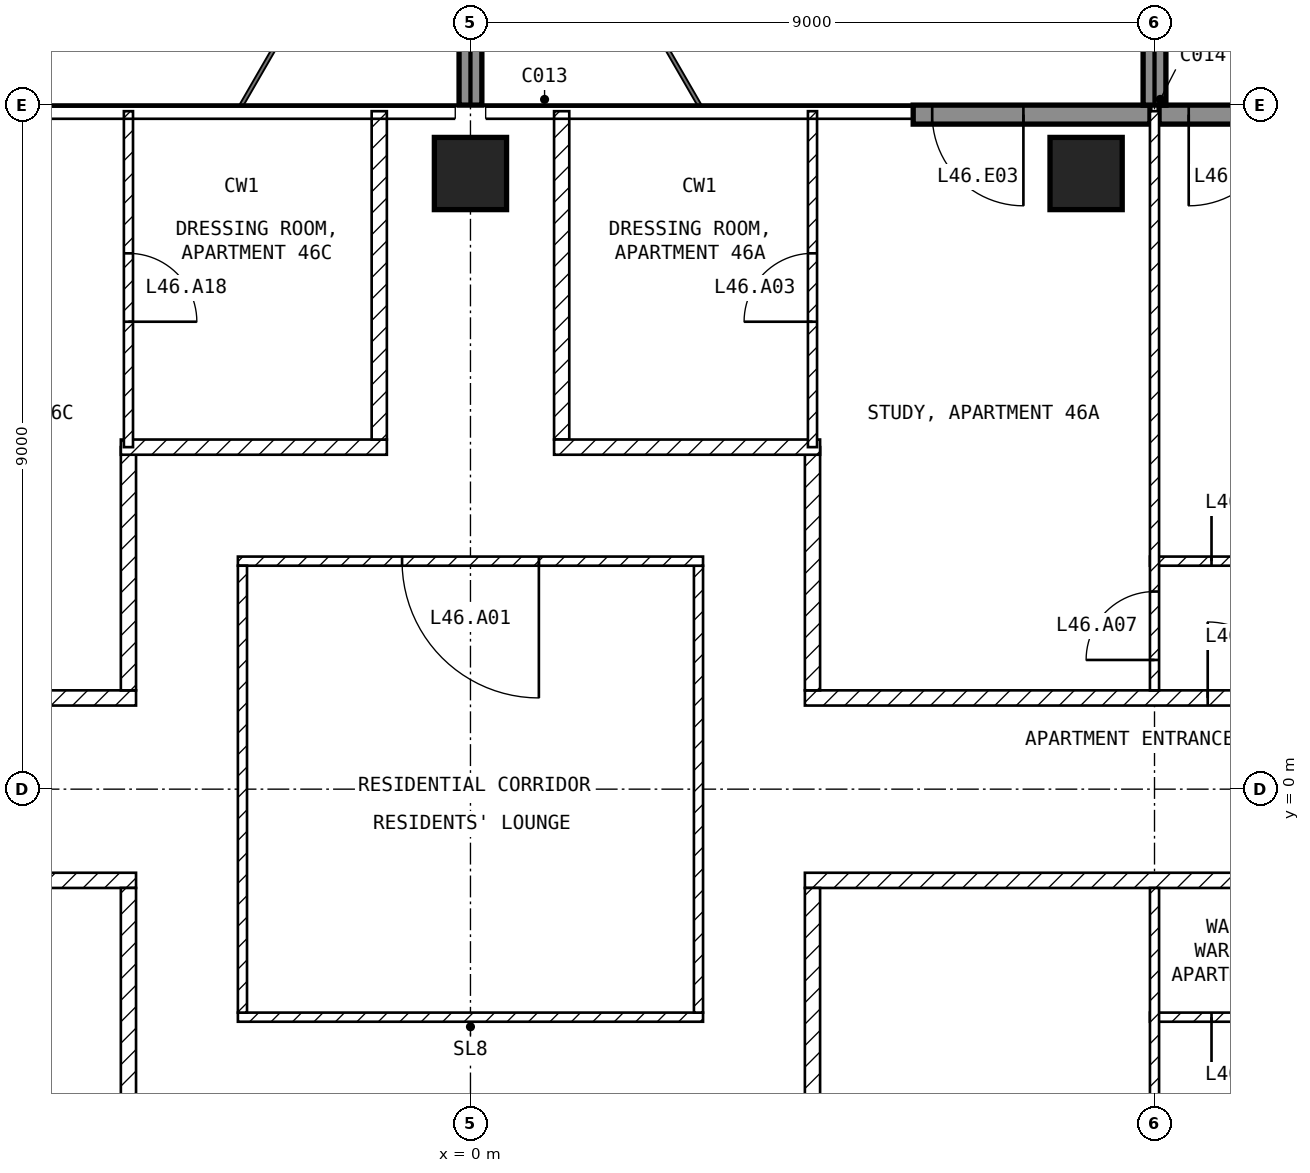
"""IFC4 building model, lengths in metres.
Left out: names, types, materials, properties, quantities, classifications, styles, units other than length and angle.
Written with IfcOpenShell. Run it as: python <this file> out.ifc"""

import sys

from ifc_helpers import new_model, si_unit, direction, frame, frame_2d, origin, origin_2d, place, context, subcontext, project, spatial, rectangle, extrude, element, fill, save


model = new_model("IFC4")
c1 = context("Model", 3, precision=1e-05, world=origin(), true_north=direction((0.0, 1.0)))
c2 = subcontext(c1, "Body", "Model", "MODEL_VIEW")
j1 = project(units=[si_unit("LENGTHUNIT", "METRE"), si_unit("PLANEANGLEUNIT", "RADIAN")], contexts=[c1])
p1 = place(None, origin())
s1 = spatial("IfcSite", under=j1, at=p1, CompositionType="ELEMENT")
p2 = place(p1, origin())
s2 = spatial("IfcBuilding", under=s1, at=p2, CompositionType="ELEMENT")
p3 = place(p2, frame((0.0, 0.0, 187.6)))
s3 = spatial("IfcBuildingStorey", under=s2, at=p3, CompositionType="ELEMENT", Elevation=187.6)
for number, where, z_axis, x_axis in (
    (1, (0.0, 8.1, -0.25), (0.0, 0.0, 1.0), (1.0, 0.0, 0.0)),
    (2, (8.1, 8.1, -0.25), (0.0, 0.0, 1.0), (1.0, 0.0, 0.0)),
):
    element("IfcColumn", number, at=place(p3, frame(where, z_axis=z_axis, x_axis=x_axis)), inside=s3, PredefinedType="COLUMN", context=c2, shape_type="SweptSolid", body=[
        extrude(rectangle(XDim=0.95, YDim=0.95, at=origin_2d()), origin(), (0.0, 0.0, 1.0), 3.5),
    ])
p4 = place(p3, frame((10.9, 8.875, 0.0), z_axis=(0.0, 0.0, 1.0), x_axis=(-1.0, 0.0, 0.0)))
e3 = element("IfcWall", 3, at=p4, inside=s3, PredefinedType="SOLIDWALL", context=c2, shape_type="SweptSolid", body=[
    extrude(rectangle(XDim=1.84, YDim=0.25, at=frame_2d((0.92, 0.0))), origin(), (0.0, 0.0, 1.0), 3.25),
])
p5 = place(p4, frame((0.25, 0.0, 0.0)))
e4 = element("IfcOpeningElement", 4, at=p5, cuts=e3, PredefinedType="OPENING", context=c2, shape_type="SweptSolid", body=[
    extrude(rectangle(XDim=1.2, YDim=2.4, at=frame_2d((0.6, 1.2))), frame((0.0, 0.135, 0.0), z_axis=(0.0, -1.0, 0.0), x_axis=(1.0, 0.0, 0.0)), (0.0, 0.0, 1.0), 0.27),
])
p6 = place(p3, frame((8.94, 8.875, 0.0), z_axis=(0.0, 0.0, 1.0), x_axis=(-1.0, 0.0, 0.0)))
e5 = element("IfcWall", 5, at=p6, inside=s3, PredefinedType="SOLIDWALL", context=c2, shape_type="SweptSolid", body=[
    extrude(rectangle(XDim=3.115, YDim=0.25, at=frame_2d((1.558, 0.0))), origin(), (0.0, 0.0, 1.0), 3.25),
])
p7 = place(p6, frame((1.665, 0.0, 0.0)))
e6 = element("IfcOpeningElement", 6, at=p7, cuts=e5, PredefinedType="OPENING", context=c2, shape_type="SweptSolid", body=[
    extrude(rectangle(XDim=1.2, YDim=2.4, at=frame_2d((0.6, 1.2))), frame((0.0, 0.135, 0.0), z_axis=(0.0, -1.0, 0.0), x_axis=(1.0, 0.0, 0.0)), (0.0, 0.0, 1.0), 0.27),
])
for number, where, z_axis, x_axis in (
    (7, (0.0, 9.0, 0.0), (0.0, 0.0, 1.0), (0.0, 1.0, 0.0)),
    (8, (9.0, 9.0, 0.0), (0.0, 0.0, 1.0), (0.0, 1.0, 0.0)),
):
    element("IfcWall", number, at=place(p3, frame(where, z_axis=z_axis, x_axis=x_axis)), inside=s3, PredefinedType="SOLIDWALL", context=c2, shape_type="SweptSolid", body=[
        extrude(rectangle(XDim=2.7, YDim=0.3, at=frame_2d((1.35, 0.0))), origin(), (0.0, 0.0, 1.0), 3.25),
    ])
p8 = place(p3, frame((-3.06, -3.0, 0.0), z_axis=(0.0, 0.0, 1.0), x_axis=(1.0, 0.0, 0.0)))
e9 = element("IfcWall", 9, at=p8, inside=s3, PredefinedType="PARTITIONING", context=c2, shape_type="SweptSolid", body=[
    extrude(rectangle(XDim=6.12, YDim=0.12, at=frame_2d((3.06, 0.0))), origin(), (0.0, 0.0, 1.0), 3.25),
])
p9 = place(p3, frame((3.0, -2.94, 0.0), z_axis=(0.0, 0.0, 1.0), x_axis=(0.0, 1.0, 0.0)))
e10 = element("IfcWall", 10, at=p9, inside=s3, PredefinedType="PARTITIONING", context=c2, shape_type="SweptSolid", body=[
    extrude(rectangle(XDim=5.88, YDim=0.12, at=frame_2d((2.94, 0.0))), origin(), (0.0, 0.0, 1.0), 3.25),
])
p10 = place(p3, frame((3.06, 3.0, 0.0), z_axis=(0.0, 0.0, 1.0), x_axis=(-1.0, 0.0, 0.0)))
e11 = element("IfcWall", 11, at=p10, inside=s3, PredefinedType="PARTITIONING", context=c2, shape_type="SweptSolid", body=[
    extrude(rectangle(XDim=6.12, YDim=0.12, at=frame_2d((3.06, 0.0))), origin(), (0.0, 0.0, 1.0), 3.25),
])
p11 = place(p10, frame((2.16, 0.0, 0.0)))
e12 = element("IfcOpeningElement", 12, at=p11, cuts=e11, PredefinedType="OPENING", context=c2, shape_type="SweptSolid", body=[
    extrude(rectangle(XDim=1.8, YDim=2.1, at=frame_2d((0.9, 1.05))), frame((0.0, 0.07, 0.0), z_axis=(0.0, -1.0, 0.0), x_axis=(1.0, 0.0, 0.0)), (0.0, 0.0, 1.0), 0.14),
])
p12 = place(p3, frame((-3.0, 2.94, 0.0), z_axis=(0.0, 0.0, 1.0), x_axis=(0.0, -1.0, 0.0)))
e13 = element("IfcWall", 13, at=p12, inside=s3, PredefinedType="PARTITIONING", context=c2, shape_type="SweptSolid", body=[
    extrude(rectangle(XDim=5.88, YDim=0.12, at=frame_2d((2.94, 0.0))), origin(), (0.0, 0.0, 1.0), 3.25),
])
p13 = place(p3, frame((4.4, 1.2, 0.0), z_axis=(0.0, 0.0, 1.0), x_axis=(1.0, 0.0, 0.0)))
e14 = element("IfcWall", 14, at=p13, inside=s3, PredefinedType="PARTITIONING", context=c2, shape_type="SweptSolid", body=[
    extrude(rectangle(XDim=17.2, YDim=0.2, at=frame_2d((8.6, 0.0))), origin(), (0.0, 0.0, 1.0), 3.25),
])
p14 = place(p13, frame((5.3, 0.0, 0.0)))
e15 = element("IfcOpeningElement", 15, at=p14, cuts=e14, PredefinedType="OPENING", context=c2, shape_type="SweptSolid", body=[
    extrude(rectangle(XDim=1.0, YDim=2.1, at=frame_2d((0.5, 1.05))), frame((0.0, 0.11, 0.0), z_axis=(0.0, -1.0, 0.0), x_axis=(1.0, 0.0, 0.0)), (0.0, 0.0, 1.0), 0.22),
])
p15 = place(p3, frame((4.5, 4.5, 0.0), z_axis=(0.0, 0.0, 1.0), x_axis=(0.0, -1.0, 0.0)))
e16 = element("IfcWall", 16, at=p15, inside=s3, PredefinedType="PARTITIONING", context=c2, shape_type="SweptSolid", body=[
    extrude(rectangle(XDim=3.2, YDim=0.2, at=frame_2d((1.6, 0.0))), origin(), (0.0, 0.0, 1.0), 3.25),
])
p16 = place(p3, frame((1.2, 8.92, 0.0), z_axis=(0.0, 0.0, 1.0), x_axis=(0.0, -1.0, 0.0)))
e17 = element("IfcWall", 17, at=p16, inside=s3, PredefinedType="PARTITIONING", context=c2, shape_type="SweptSolid", body=[
    extrude(rectangle(XDim=4.32, YDim=0.2, at=frame_2d((2.16, 0.0))), origin(), (0.0, 0.0, 1.0), 3.25),
])
p17 = place(p3, frame((1.1, 4.5, 0.0), z_axis=(0.0, 0.0, 1.0), x_axis=(1.0, 0.0, 0.0)))
e18 = element("IfcWall", 18, at=p17, inside=s3, PredefinedType="PARTITIONING", context=c2, shape_type="SweptSolid", body=[
    extrude(rectangle(XDim=3.5, YDim=0.2, at=frame_2d((1.75, 0.0))), origin(), (0.0, 0.0, 1.0), 3.25),
])
p18 = place(p3, frame((21.6, -1.2, 0.0), z_axis=(0.0, 0.0, 1.0), x_axis=(-1.0, 0.0, 0.0)))
e19 = element("IfcWall", 19, at=p18, inside=s3, PredefinedType="PARTITIONING", context=c2, shape_type="SweptSolid", body=[
    extrude(rectangle(XDim=17.2, YDim=0.2, at=frame_2d((8.6, 0.0))), origin(), (0.0, 0.0, 1.0), 3.25),
])
p19 = place(p18, frame((6.1, 0.0, 0.0)))
e20 = element("IfcOpeningElement", 20, at=p19, cuts=e19, PredefinedType="OPENING", context=c2, shape_type="SweptSolid", body=[
    extrude(rectangle(XDim=1.0, YDim=2.1, at=frame_2d((0.5, 1.05))), frame((0.0, 0.11, 0.0), z_axis=(0.0, -1.0, 0.0), x_axis=(1.0, 0.0, 0.0)), (0.0, 0.0, 1.0), 0.22),
])
p20 = place(p3, frame((4.5, -1.3, 0.0), z_axis=(0.0, 0.0, 1.0), x_axis=(0.0, -1.0, 0.0)))
e21 = element("IfcWall", 21, at=p20, inside=s3, PredefinedType="PARTITIONING", context=c2, shape_type="SweptSolid", body=[
    extrude(rectangle(XDim=3.2, YDim=0.2, at=frame_2d((1.6, 0.0))), origin(), (0.0, 0.0, 1.0), 3.25),
])
p21 = place(p3, frame((-21.6, 1.2, 0.0), z_axis=(0.0, 0.0, 1.0), x_axis=(1.0, 0.0, 0.0)))
e22 = element("IfcWall", 22, at=p21, inside=s3, PredefinedType="PARTITIONING", context=c2, shape_type="SweptSolid", body=[
    extrude(rectangle(XDim=17.2, YDim=0.2, at=frame_2d((8.6, 0.0))), origin(), (0.0, 0.0, 1.0), 3.25),
])
p22 = place(p21, frame((6.1, 0.0, 0.0)))
e23 = element("IfcOpeningElement", 23, at=p22, cuts=e22, PredefinedType="OPENING", context=c2, shape_type="SweptSolid", body=[
    extrude(rectangle(XDim=1.0, YDim=2.1, at=frame_2d((0.5, 1.05))), frame((0.0, 0.11, 0.0), z_axis=(0.0, -1.0, 0.0), x_axis=(1.0, 0.0, 0.0)), (0.0, 0.0, 1.0), 0.22),
])
p23 = place(p3, frame((-4.5, 1.3, 0.0), z_axis=(0.0, 0.0, 1.0), x_axis=(0.0, 1.0, 0.0)))
e24 = element("IfcWall", 24, at=p23, inside=s3, PredefinedType="PARTITIONING", context=c2, shape_type="SweptSolid", body=[
    extrude(rectangle(XDim=3.2, YDim=0.2, at=frame_2d((1.6, 0.0))), origin(), (0.0, 0.0, 1.0), 3.25),
])
p24 = place(p3, frame((-4.6, 4.5, 0.0), z_axis=(0.0, 0.0, 1.0), x_axis=(1.0, 0.0, 0.0)))
e25 = element("IfcWall", 25, at=p24, inside=s3, PredefinedType="PARTITIONING", context=c2, shape_type="SweptSolid", body=[
    extrude(rectangle(XDim=3.5, YDim=0.2, at=frame_2d((1.75, 0.0))), origin(), (0.0, 0.0, 1.0), 3.25),
])
p25 = place(p3, frame((-1.2, 4.6, 0.0), z_axis=(0.0, 0.0, 1.0), x_axis=(0.0, 1.0, 0.0)))
e26 = element("IfcWall", 26, at=p25, inside=s3, PredefinedType="PARTITIONING", context=c2, shape_type="SweptSolid", body=[
    extrude(rectangle(XDim=4.32, YDim=0.2, at=frame_2d((2.16, 0.0))), origin(), (0.0, 0.0, 1.0), 3.25),
])
p26 = place(p3, frame((-4.4, -1.2, 0.0), z_axis=(0.0, 0.0, 1.0), x_axis=(-1.0, 0.0, 0.0)))
e27 = element("IfcWall", 27, at=p26, inside=s3, PredefinedType="PARTITIONING", context=c2, shape_type="SweptSolid", body=[
    extrude(rectangle(XDim=17.2, YDim=0.2, at=frame_2d((8.6, 0.0))), origin(), (0.0, 0.0, 1.0), 3.25),
])
p27 = place(p26, frame((5.3, 0.0, 0.0)))
e28 = element("IfcOpeningElement", 28, at=p27, cuts=e27, PredefinedType="OPENING", context=c2, shape_type="SweptSolid", body=[
    extrude(rectangle(XDim=1.0, YDim=2.1, at=frame_2d((0.5, 1.05))), frame((0.0, 0.11, 0.0), z_axis=(0.0, -1.0, 0.0), x_axis=(1.0, 0.0, 0.0)), (0.0, 0.0, 1.0), 0.22),
])
p28 = place(p3, frame((-4.5, -4.5, 0.0), z_axis=(0.0, 0.0, 1.0), x_axis=(0.0, 1.0, 0.0)))
e29 = element("IfcWall", 29, at=p28, inside=s3, PredefinedType="PARTITIONING", context=c2, shape_type="SweptSolid", body=[
    extrude(rectangle(XDim=3.2, YDim=0.2, at=frame_2d((1.6, 0.0))), origin(), (0.0, 0.0, 1.0), 3.25),
])
p29 = place(p3, frame((8.94, 3.0, 0.0), z_axis=(0.0, 0.0, 1.0), x_axis=(1.0, 0.0, 0.0)))
e30 = element("IfcWall", 30, at=p29, inside=s3, PredefinedType="PARTITIONING", context=c2, shape_type="SweptSolid", body=[
    extrude(rectangle(XDim=5.46, YDim=0.12, at=frame_2d((2.73, 0.0))), origin(), (0.0, 0.0, 1.0), 3.25),
])
p30 = place(p29, frame((0.81, 0.0, 0.0)))
e31 = element("IfcOpeningElement", 31, at=p30, cuts=e30, PredefinedType="OPENING", context=c2, shape_type="SweptSolid", body=[
    extrude(rectangle(XDim=0.9, YDim=2.1, at=frame_2d((0.45, 1.05))), frame((0.0, 0.07, 0.0), z_axis=(0.0, -1.0, 0.0), x_axis=(1.0, 0.0, 0.0)), (0.0, 0.0, 1.0), 0.14),
])
p31 = place(p3, frame((9.0, 1.3, 0.0), z_axis=(0.0, 0.0, 1.0), x_axis=(0.0, 1.0, 0.0)))
e32 = element("IfcWall", 32, at=p31, inside=s3, PredefinedType="PARTITIONING", context=c2, shape_type="SweptSolid", body=[
    extrude(rectangle(XDim=7.62, YDim=0.12, at=frame_2d((3.81, 0.0))), origin(), (0.0, 0.0, 1.0), 3.25),
])
p32 = place(p31, frame((0.4, 0.0, 0.0)))
e33 = element("IfcOpeningElement", 33, at=p32, cuts=e32, PredefinedType="OPENING", context=c2, shape_type="SweptSolid", body=[
    extrude(rectangle(XDim=0.9, YDim=2.1, at=frame_2d((0.45, 1.05))), frame((0.0, 0.07, 0.0), z_axis=(0.0, -1.0, 0.0), x_axis=(1.0, 0.0, 0.0)), (0.0, 0.0, 1.0), 0.14),
])
p33 = place(p3, frame((4.5, 4.5, 0.0), z_axis=(0.0, 0.0, 1.0), x_axis=(0.0, 1.0, 0.0)))
e34 = element("IfcWall", 34, at=p33, inside=s3, PredefinedType="PARTITIONING", context=c2, shape_type="SweptSolid", body=[
    extrude(rectangle(XDim=4.42, YDim=0.12, at=frame_2d((2.21, 0.0))), origin(), (0.0, 0.0, 1.0), 3.25),
])
p34 = place(p33, frame((1.65, 0.0, 0.0)))
e35 = element("IfcOpeningElement", 35, at=p34, cuts=e34, PredefinedType="OPENING", context=c2, shape_type="SweptSolid", body=[
    extrude(rectangle(XDim=0.9, YDim=2.1, at=frame_2d((0.45, 1.05))), frame((0.0, 0.07, 0.0), z_axis=(0.0, -1.0, 0.0), x_axis=(1.0, 0.0, 0.0)), (0.0, 0.0, 1.0), 0.14),
])
p35 = place(p3, frame((11.4, -3.0, 0.0), z_axis=(0.0, 0.0, 1.0), x_axis=(-1.0, 0.0, 0.0)))
e36 = element("IfcWall", 36, at=p35, inside=s3, PredefinedType="PARTITIONING", context=c2, shape_type="SweptSolid", body=[
    extrude(rectangle(XDim=2.46, YDim=0.12, at=frame_2d((1.23, 0.0))), origin(), (0.0, 0.0, 1.0), 3.25),
])
p36 = place(p35, frame((0.75, 0.0, 0.0)))
e37 = element("IfcOpeningElement", 37, at=p36, cuts=e36, PredefinedType="OPENING", context=c2, shape_type="SweptSolid", body=[
    extrude(rectangle(XDim=0.9, YDim=2.1, at=frame_2d((0.45, 1.05))), frame((0.0, 0.07, 0.0), z_axis=(0.0, -1.0, 0.0), x_axis=(1.0, 0.0, 0.0)), (0.0, 0.0, 1.0), 0.14),
])
p37 = place(p3, frame((9.0, -8.92, 0.0), z_axis=(0.0, 0.0, 1.0), x_axis=(0.0, 1.0, 0.0)))
e38 = element("IfcWall", 38, at=p37, inside=s3, PredefinedType="PARTITIONING", context=c2, shape_type="SweptSolid", body=[
    extrude(rectangle(XDim=7.62, YDim=0.12, at=frame_2d((3.81, 0.0))), origin(), (0.0, 0.0, 1.0), 3.25),
])
p38 = place(p37, frame((2.62, 0.0, 0.0)))
e39 = element("IfcOpeningElement", 39, at=p38, cuts=e38, PredefinedType="OPENING", context=c2, shape_type="SweptSolid", body=[
    extrude(rectangle(XDim=0.9, YDim=2.1, at=frame_2d((0.45, 1.05))), frame((0.0, 0.07, 0.0), z_axis=(0.0, -1.0, 0.0), x_axis=(1.0, 0.0, 0.0)), (0.0, 0.0, 1.0), 0.14),
])
p39 = place(p3, frame((-4.5, 8.92, 0.0), z_axis=(0.0, 0.0, 1.0), x_axis=(0.0, -1.0, 0.0)))
e40 = element("IfcWall", 40, at=p39, inside=s3, PredefinedType="PARTITIONING", context=c2, shape_type="SweptSolid", body=[
    extrude(rectangle(XDim=4.42, YDim=0.12, at=frame_2d((2.21, 0.0))), origin(), (0.0, 0.0, 1.0), 3.25),
])
p40 = place(p39, frame((1.87, 0.0, 0.0)))
e41 = element("IfcOpeningElement", 41, at=p40, cuts=e40, PredefinedType="OPENING", context=c2, shape_type="SweptSolid", body=[
    extrude(rectangle(XDim=0.9, YDim=2.1, at=frame_2d((0.45, 1.05))), frame((0.0, 0.07, 0.0), z_axis=(0.0, -1.0, 0.0), x_axis=(1.0, 0.0, 0.0)), (0.0, 0.0, 1.0), 0.14),
])
p41 = place(p5, origin())
e42 = element("IfcDoor", 42, at=p41, inside=s3, OperationType="SINGLE_SWING_RIGHT", PredefinedType="DOOR", context=c2, shape_type="SweptSolid", body=[
    extrude(rectangle(XDim=1.2, YDim=2.4, at=frame_2d((0.6, 1.2))), frame((0.0, 0.025, 0.0), z_axis=(0.0, -1.0, 0.0), x_axis=(1.0, 0.0, 0.0)), (0.0, 0.0, 1.0), 0.05),
])
fill(e4, e42)
p42 = place(p7, origin())
e43 = element("IfcDoor", 43, at=p42, inside=s3, OperationType="SINGLE_SWING_LEFT", PredefinedType="DOOR", context=c2, shape_type="SweptSolid", body=[
    extrude(rectangle(XDim=1.2, YDim=2.4, at=frame_2d((0.6, 1.2))), frame((0.0, 0.025, 0.0), z_axis=(0.0, -1.0, 0.0), x_axis=(1.0, 0.0, 0.0)), (0.0, 0.0, 1.0), 0.05),
])
fill(e6, e43)
p43 = place(p11, origin())
e44 = element("IfcDoor", 44, at=p43, inside=s3, OperationType="SINGLE_SWING_LEFT", PredefinedType="DOOR", context=c2, shape_type="SweptSolid", body=[
    extrude(rectangle(XDim=1.8, YDim=2.1, at=frame_2d((0.9, 1.05))), frame((0.0, 0.025, 0.0), z_axis=(0.0, -1.0, 0.0), x_axis=(1.0, 0.0, 0.0)), (0.0, 0.0, 1.0), 0.05),
])
fill(e12, e44)
p44 = place(p34, origin())
e45 = element("IfcDoor", 45, at=p44, inside=s3, OperationType="SINGLE_SWING_LEFT", PredefinedType="DOOR", context=c2, shape_type="SweptSolid", body=[
    extrude(rectangle(XDim=0.9, YDim=2.1, at=frame_2d((0.45, 1.05))), frame((0.0, 0.025, 0.0), z_axis=(0.0, -1.0, 0.0), x_axis=(1.0, 0.0, 0.0)), (0.0, 0.0, 1.0), 0.05),
])
fill(e35, e45)
p45 = place(p30, origin())
e46 = element("IfcDoor", 46, at=p45, inside=s3, OperationType="SINGLE_SWING_LEFT", PredefinedType="DOOR", context=c2, shape_type="SweptSolid", body=[
    extrude(rectangle(XDim=0.9, YDim=2.1, at=frame_2d((0.45, 1.05))), frame((0.0, 0.025, 0.0), z_axis=(0.0, -1.0, 0.0), x_axis=(1.0, 0.0, 0.0)), (0.0, 0.0, 1.0), 0.05),
])
fill(e31, e46)
p46 = place(p32, origin())
e47 = element("IfcDoor", 47, at=p46, inside=s3, OperationType="SINGLE_SWING_LEFT", PredefinedType="DOOR", context=c2, shape_type="SweptSolid", body=[
    extrude(rectangle(XDim=0.9, YDim=2.1, at=frame_2d((0.45, 1.05))), frame((0.0, 0.025, 0.0), z_axis=(0.0, -1.0, 0.0), x_axis=(1.0, 0.0, 0.0)), (0.0, 0.0, 1.0), 0.05),
])
fill(e33, e47)
p47 = place(p36, origin())
e48 = element("IfcDoor", 48, at=p47, inside=s3, OperationType="SINGLE_SWING_RIGHT", PredefinedType="DOOR", context=c2, shape_type="SweptSolid", body=[
    extrude(rectangle(XDim=0.9, YDim=2.1, at=frame_2d((0.45, 1.05))), frame((0.0, 0.025, 0.0), z_axis=(0.0, -1.0, 0.0), x_axis=(1.0, 0.0, 0.0)), (0.0, 0.0, 1.0), 0.05),
])
fill(e37, e48)
p48 = place(p40, origin())
e49 = element("IfcDoor", 49, at=p48, inside=s3, OperationType="SINGLE_SWING_RIGHT", PredefinedType="DOOR", context=c2, shape_type="SweptSolid", body=[
    extrude(rectangle(XDim=0.9, YDim=2.1, at=frame_2d((0.45, 1.05))), frame((0.0, 0.025, 0.0), z_axis=(0.0, -1.0, 0.0), x_axis=(1.0, 0.0, 0.0)), (0.0, 0.0, 1.0), 0.05),
])
fill(e41, e49)
p49 = place(p14, origin())
e50 = element("IfcDoor", 50, at=p49, inside=s3, OperationType="SINGLE_SWING_LEFT", PredefinedType="DOOR", context=c2, shape_type="SweptSolid", body=[
    extrude(rectangle(XDim=1.0, YDim=2.1, at=frame_2d((0.5, 1.05))), frame((0.0, 0.025, 0.0), z_axis=(0.0, -1.0, 0.0), x_axis=(1.0, 0.0, 0.0)), (0.0, 0.0, 1.0), 0.05),
])
fill(e15, e50)
save(model, sys.argv[1])
